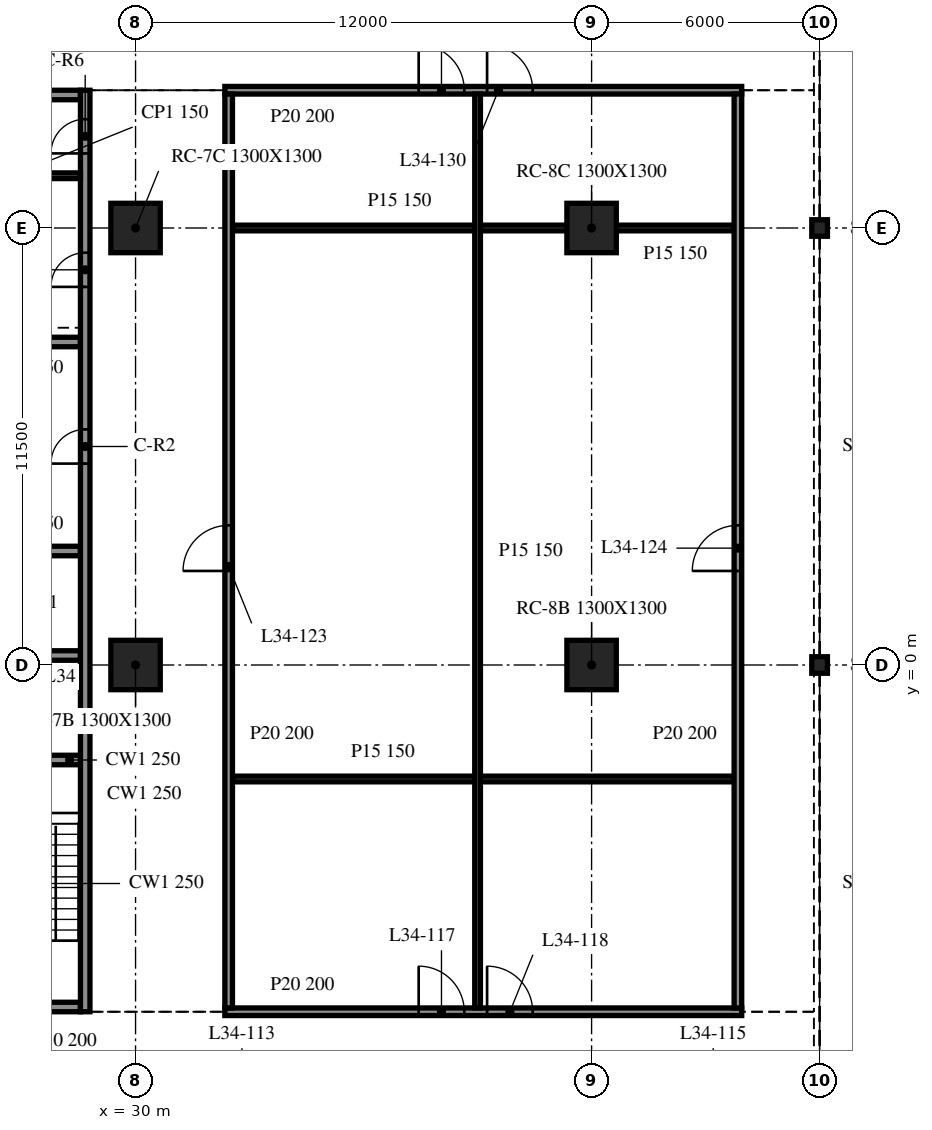
"""IFC4 building model, lengths in metres.
Left out: names, types, materials, properties, quantities, classifications, styles, units other than length and angle.
Written with IfcOpenShell. Run it as: python <this file> out.ifc"""

import sys

from ifc_helpers import new_model, si_unit, direction, frame, frame_2d, origin, origin_2d, place, context, subcontext, project, spatial, rectangle, i_section, extrude, element, fill, save


model = new_model("IFC4")
c1 = context("Model", 3, precision=1e-05, world=origin(), true_north=direction((0.0, 1.0)))
c2 = subcontext(c1, "Body", "Model", "MODEL_VIEW")
j1 = project(units=[si_unit("LENGTHUNIT", "METRE"), si_unit("PLANEANGLEUNIT", "RADIAN")], contexts=[c1])
p1 = place(None, origin())
s1 = spatial("IfcSite", under=j1, at=p1, CompositionType="ELEMENT")
p2 = place(p1, origin())
s2 = spatial("IfcBuilding", under=s1, at=p2, CompositionType="ELEMENT")
p3 = place(p2, frame((0.0, 0.0, 146.6)))
s3 = spatial("IfcBuildingStorey", under=s2, at=p3, CompositionType="ELEMENT", Elevation=146.6)
for number, where, z_axis, x_axis in (
    (1, (30.0, 0.0, -0.34), (0.0, 0.0, 1.0), (1.0, 0.0, 0.0)),
    (2, (30.0, 11.5, -0.34), (0.0, 0.0, 1.0), (1.0, 0.0, 0.0)),
    (3, (42.0, 0.0, -0.34), (0.0, 0.0, 1.0), (1.0, 0.0, 0.0)),
    (4, (42.0, 11.5, -0.34), (0.0, 0.0, 1.0), (1.0, 0.0, 0.0)),
):
    element("IfcColumn", number, at=place(p3, frame(where, z_axis=z_axis, x_axis=x_axis)), inside=s3, PredefinedType="COLUMN", context=c2, shape_type="SweptSolid", body=[
        extrude(rectangle(XDim=1.3, YDim=1.3, at=origin_2d()), origin(), (0.0, 0.0, 1.0), 4.1),
    ])
for number, where, z_axis, x_axis in (
    (5, (48.0, 0.0, -0.34), (0.0, 0.0, 1.0), (1.0, 0.0, 0.0)),
    (6, (48.0, 11.5, -0.34), (0.0, 0.0, 1.0), (1.0, 0.0, 0.0)),
):
    element("IfcColumn", number, at=place(p3, frame(where, z_axis=z_axis, x_axis=x_axis)), inside=s3, PredefinedType="COLUMN", context=c2, shape_type="SweptSolid", body=[
        extrude(i_section(OverallWidth=0.412, OverallDepth=0.434, WebThickness=0.036, FlangeThickness=0.057, at=origin_2d()), origin(), (0.0, 0.0, 1.0), 4.1),
    ])
p4 = place(p3, frame((28.675, -9.125, 0.0), z_axis=(0.0, 0.0, 1.0), x_axis=(0.0, 1.0, 0.0)))
e7 = element("IfcWall", 7, at=p4, inside=s3, PredefinedType="SOLIDWALL", context=c2, shape_type="SweptSolid", body=[
    extrude(rectangle(XDim=24.25, YDim=0.25, at=frame_2d((12.125, 0.0))), origin(), (0.0, 0.0, 1.0), 3.76),
])
p5 = place(p4, frame((14.425, 0.0, 0.0)))
e8 = element("IfcOpeningElement", 8, at=p5, cuts=e7, PredefinedType="OPENING", context=c2, shape_type="SweptSolid", body=[
    extrude(rectangle(XDim=0.9, YDim=2.1, at=frame_2d((0.45, 1.05))), frame((0.0, 0.135, 0.0), z_axis=(0.0, -1.0, 0.0), x_axis=(1.0, 0.0, 0.0)), (0.0, 0.0, 1.0), 0.27),
])
p6 = place(p4, frame((19.075, 0.0, 0.0)))
e9 = element("IfcOpeningElement", 9, at=p6, cuts=e7, PredefinedType="OPENING", context=c2, shape_type="SweptSolid", body=[
    extrude(rectangle(XDim=0.9, YDim=2.1, at=frame_2d((0.45, 1.05))), frame((0.0, 0.135, 0.0), z_axis=(0.0, -1.0, 0.0), x_axis=(1.0, 0.0, 0.0)), (0.0, 0.0, 1.0), 0.27),
])
p7 = place(p4, frame((22.587, 0.0, 0.0)))
e10 = element("IfcOpeningElement", 10, at=p7, cuts=e7, PredefinedType="OPENING", context=c2, shape_type="SweptSolid", body=[
    extrude(rectangle(XDim=0.9, YDim=2.1, at=frame_2d((0.45, 1.05))), frame((0.0, 0.135, 0.0), z_axis=(0.0, -1.0, 0.0), x_axis=(1.0, 0.0, 0.0)), (0.0, 0.0, 1.0), 0.27),
])
p8 = place(p3, frame((28.55, -9.0, 0.0), z_axis=(0.0, 0.0, 1.0), x_axis=(-1.0, 0.0, 0.0)))
e11 = element("IfcWall", 11, at=p8, inside=s3, PredefinedType="SOLIDWALL", context=c2, shape_type="SweptSolid", body=[
    extrude(rectangle(XDim=9.1, YDim=0.25, at=frame_2d((4.55, 0.0))), origin(), (0.0, 0.0, 1.0), 3.76),
])
p9 = place(p8, frame((3.65, 0.0, 0.0)))
e12 = element("IfcOpeningElement", 12, at=p9, cuts=e11, PredefinedType="OPENING", context=c2, shape_type="SweptSolid", body=[
    extrude(rectangle(XDim=1.8, YDim=2.1, at=frame_2d((0.9, 1.05))), frame((0.0, 0.135, 0.0), z_axis=(0.0, -1.0, 0.0), x_axis=(1.0, 0.0, 0.0)), (0.0, 0.0, 1.0), 0.27),
])
p10 = place(p3, frame((19.45, 15.0, 0.0), z_axis=(0.0, 0.0, 1.0), x_axis=(1.0, 0.0, 0.0)))
e13 = element("IfcWall", 13, at=p10, inside=s3, PredefinedType="SOLIDWALL", context=c2, shape_type="SweptSolid", body=[
    extrude(rectangle(XDim=9.1, YDim=0.25, at=frame_2d((4.55, 0.0))), origin(), (0.0, 0.0, 1.0), 3.76),
])
p11 = place(p10, frame((3.65, 0.0, 0.0)))
e14 = element("IfcOpeningElement", 14, at=p11, cuts=e13, PredefinedType="OPENING", context=c2, shape_type="SweptSolid", body=[
    extrude(rectangle(XDim=1.8, YDim=2.1, at=frame_2d((0.9, 1.05))), frame((0.0, 0.135, 0.0), z_axis=(0.0, -1.0, 0.0), x_axis=(1.0, 0.0, 0.0)), (0.0, 0.0, 1.0), 0.27),
])
for number, where, z_axis, x_axis in (
    (15, (25.7, -2.5, 0.0), (0.0, 0.0, 1.0), (1.0, 0.0, 0.0)),
    (16, (25.7, 0.25, 0.0), (0.0, 0.0, 1.0), (1.0, 0.0, 0.0)),
    (17, (25.7, 3.0, 0.0), (0.0, 0.0, 1.0), (1.0, 0.0, 0.0)),
    (18, (25.7, 8.5, 0.0), (0.0, 0.0, 1.0), (1.0, 0.0, 0.0)),
):
    element("IfcWall", number, at=place(p3, frame(where, z_axis=z_axis, x_axis=x_axis)), inside=s3, PredefinedType="SOLIDWALL", context=c2, shape_type="SweptSolid", body=[
        extrude(rectangle(XDim=2.85, YDim=0.25, at=frame_2d((1.425, 0.0))), origin(), (0.0, 0.0, 1.0), 3.76),
    ])
p12 = place(p3, frame((25.7, 12.875, 0.0), z_axis=(0.0, 0.0, 1.0), x_axis=(1.0, 0.0, 0.0)))
e19 = element("IfcWall", 19, at=p12, inside=s3, PredefinedType="PARTITIONING", context=c2, shape_type="SweptSolid", body=[
    extrude(rectangle(XDim=2.85, YDim=0.15, at=frame_2d((1.425, 0.0))), origin(), (0.0, 0.0, 1.0), 3.76),
])
p13 = place(p3, frame((32.35, -9.125, 0.0), z_axis=(0.0, 0.0, 1.0), x_axis=(1.0, 0.0, 0.0)))
e20 = element("IfcWall", 20, at=p13, inside=s3, PredefinedType="PARTITIONING", context=c2, shape_type="SweptSolid", body=[
    extrude(rectangle(XDim=13.6, YDim=0.2, at=frame_2d((6.8, 0.0))), origin(), (0.0, 0.0, 1.0), 3.76),
])
p14 = place(p13, frame((5.1, 0.0, 0.0)))
e21 = element("IfcOpeningElement", 21, at=p14, cuts=e20, PredefinedType="OPENING", context=c2, shape_type="SweptSolid", body=[
    extrude(rectangle(XDim=1.2, YDim=2.1, at=frame_2d((0.6, 1.05))), frame((0.0, 0.11, 0.0), z_axis=(0.0, -1.0, 0.0), x_axis=(1.0, 0.0, 0.0)), (0.0, 0.0, 1.0), 0.22),
])
p15 = place(p13, frame((6.9, 0.0, 0.0)))
e22 = element("IfcOpeningElement", 22, at=p15, cuts=e20, PredefinedType="OPENING", context=c2, shape_type="SweptSolid", body=[
    extrude(rectangle(XDim=1.2, YDim=2.1, at=frame_2d((0.6, 1.05))), frame((0.0, 0.11, 0.0), z_axis=(0.0, -1.0, 0.0), x_axis=(1.0, 0.0, 0.0)), (0.0, 0.0, 1.0), 0.22),
])
p16 = place(p3, frame((32.55, -3.0, 0.0), z_axis=(0.0, 0.0, 1.0), x_axis=(1.0, 0.0, 0.0)))
e23 = element("IfcWall", 23, at=p16, inside=s3, PredefinedType="PARTITIONING", context=c2, shape_type="SweptSolid", body=[
    extrude(rectangle(XDim=13.2, YDim=0.15, at=frame_2d((6.6, 0.0))), origin(), (0.0, 0.0, 1.0), 3.76),
])
p17 = place(p3, frame((32.55, 11.5, 0.0), z_axis=(0.0, 0.0, 1.0), x_axis=(1.0, 0.0, 0.0)))
e24 = element("IfcWall", 24, at=p17, inside=s3, PredefinedType="PARTITIONING", context=c2, shape_type="SweptSolid", body=[
    extrude(rectangle(XDim=8.8, YDim=0.15, at=frame_2d((4.4, 0.0))), origin(), (0.0, 0.0, 1.0), 3.76),
])
p18 = place(p3, frame((42.65, 11.5, 0.0), z_axis=(0.0, 0.0, 1.0), x_axis=(1.0, 0.0, 0.0)))
e25 = element("IfcWall", 25, at=p18, inside=s3, PredefinedType="PARTITIONING", context=c2, shape_type="SweptSolid", body=[
    extrude(rectangle(XDim=3.1, YDim=0.15, at=frame_2d((1.55, 0.0))), origin(), (0.0, 0.0, 1.0), 3.76),
])
p19 = place(p3, frame((32.35, 15.125, 0.0), z_axis=(0.0, 0.0, 1.0), x_axis=(1.0, 0.0, 0.0)))
e26 = element("IfcWall", 26, at=p19, inside=s3, PredefinedType="PARTITIONING", context=c2, shape_type="SweptSolid", body=[
    extrude(rectangle(XDim=13.6, YDim=0.2, at=frame_2d((6.8, 0.0))), origin(), (0.0, 0.0, 1.0), 3.76),
])
p20 = place(p19, frame((5.1, 0.0, 0.0)))
e27 = element("IfcOpeningElement", 27, at=p20, cuts=e26, PredefinedType="OPENING", context=c2, shape_type="SweptSolid", body=[
    extrude(rectangle(XDim=1.2, YDim=2.1, at=frame_2d((0.6, 1.05))), frame((0.0, 0.11, 0.0), z_axis=(0.0, -1.0, 0.0), x_axis=(1.0, 0.0, 0.0)), (0.0, 0.0, 1.0), 0.22),
])
p21 = place(p19, frame((6.9, 0.0, 0.0)))
e28 = element("IfcOpeningElement", 28, at=p21, cuts=e26, PredefinedType="OPENING", context=c2, shape_type="SweptSolid", body=[
    extrude(rectangle(XDim=1.2, YDim=2.1, at=frame_2d((0.6, 1.05))), frame((0.0, 0.11, 0.0), z_axis=(0.0, -1.0, 0.0), x_axis=(1.0, 0.0, 0.0)), (0.0, 0.0, 1.0), 0.22),
])
p22 = place(p3, frame((32.45, -9.025, 0.0), z_axis=(0.0, 0.0, 1.0), x_axis=(0.0, 1.0, 0.0)))
e29 = element("IfcWall", 29, at=p22, inside=s3, PredefinedType="PARTITIONING", context=c2, shape_type="SweptSolid", body=[
    extrude(rectangle(XDim=24.05, YDim=0.2, at=frame_2d((12.025, 0.0))), origin(), (0.0, 0.0, 1.0), 3.76),
])
p23 = place(p22, frame((11.5, 0.0, 0.0)))
e30 = element("IfcOpeningElement", 30, at=p23, cuts=e29, PredefinedType="OPENING", context=c2, shape_type="SweptSolid", body=[
    extrude(rectangle(XDim=1.2, YDim=2.1, at=frame_2d((0.6, 1.05))), frame((0.0, 0.11, 0.0), z_axis=(0.0, -1.0, 0.0), x_axis=(1.0, 0.0, 0.0)), (0.0, 0.0, 1.0), 0.22),
])
p24 = place(p3, frame((39.0, -9.025, 0.0), z_axis=(0.0, 0.0, 1.0), x_axis=(0.0, 1.0, 0.0)))
e31 = element("IfcWall", 31, at=p24, inside=s3, PredefinedType="PARTITIONING", context=c2, shape_type="SweptSolid", body=[
    extrude(rectangle(XDim=24.05, YDim=0.15, at=frame_2d((12.025, 0.0))), origin(), (0.0, 0.0, 1.0), 3.76),
])
p25 = place(p3, frame((45.85, -9.025, 0.0), z_axis=(0.0, 0.0, 1.0), x_axis=(0.0, 1.0, 0.0)))
e32 = element("IfcWall", 32, at=p25, inside=s3, PredefinedType="PARTITIONING", context=c2, shape_type="SweptSolid", body=[
    extrude(rectangle(XDim=24.05, YDim=0.2, at=frame_2d((12.025, 0.0))), origin(), (0.0, 0.0, 1.0), 3.76),
])
p26 = place(p25, frame((11.5, 0.0, 0.0)))
e33 = element("IfcOpeningElement", 33, at=p26, cuts=e32, PredefinedType="OPENING", context=c2, shape_type="SweptSolid", body=[
    extrude(rectangle(XDim=1.2, YDim=2.1, at=frame_2d((0.6, 1.05))), frame((0.0, 0.11, 0.0), z_axis=(0.0, -1.0, 0.0), x_axis=(1.0, 0.0, 0.0)), (0.0, 0.0, 1.0), 0.22),
])
p27 = place(p5, origin())
e34 = element("IfcDoor", 34, at=p27, inside=s3, OperationType="SINGLE_SWING_RIGHT", PredefinedType="DOOR", context=c2, shape_type="SweptSolid", body=[
    extrude(rectangle(XDim=0.9, YDim=2.1, at=frame_2d((0.45, 1.05))), frame((0.0, 0.025, 0.0), z_axis=(0.0, -1.0, 0.0), x_axis=(1.0, 0.0, 0.0)), (0.0, 0.0, 1.0), 0.05),
])
fill(e8, e34)
p28 = place(p6, origin())
e35 = element("IfcDoor", 35, at=p28, inside=s3, OperationType="SINGLE_SWING_LEFT", PredefinedType="DOOR", context=c2, shape_type="SweptSolid", body=[
    extrude(rectangle(XDim=0.9, YDim=2.1, at=frame_2d((0.45, 1.05))), frame((0.0, 0.025, 0.0), z_axis=(0.0, -1.0, 0.0), x_axis=(1.0, 0.0, 0.0)), (0.0, 0.0, 1.0), 0.05),
])
fill(e9, e35)
p29 = place(p7, origin())
e36 = element("IfcDoor", 36, at=p29, inside=s3, OperationType="SINGLE_SWING_RIGHT", PredefinedType="DOOR", context=c2, shape_type="SweptSolid", body=[
    extrude(rectangle(XDim=0.9, YDim=2.1, at=frame_2d((0.45, 1.05))), frame((0.0, 0.025, 0.0), z_axis=(0.0, -1.0, 0.0), x_axis=(1.0, 0.0, 0.0)), (0.0, 0.0, 1.0), 0.05),
])
fill(e10, e36)
p30 = place(p14, origin())
e37 = element("IfcDoor", 37, at=p30, inside=s3, OperationType="SINGLE_SWING_LEFT", PredefinedType="DOOR", context=c2, shape_type="SweptSolid", body=[
    extrude(rectangle(XDim=1.2, YDim=2.1, at=frame_2d((0.6, 1.05))), frame((0.0, 0.025, 0.0), z_axis=(0.0, -1.0, 0.0), x_axis=(1.0, 0.0, 0.0)), (0.0, 0.0, 1.0), 0.05),
])
fill(e21, e37)
p31 = place(p15, origin())
e38 = element("IfcDoor", 38, at=p31, inside=s3, OperationType="SINGLE_SWING_RIGHT", PredefinedType="DOOR", context=c2, shape_type="SweptSolid", body=[
    extrude(rectangle(XDim=1.2, YDim=2.1, at=frame_2d((0.6, 1.05))), frame((0.0, 0.025, 0.0), z_axis=(0.0, -1.0, 0.0), x_axis=(1.0, 0.0, 0.0)), (0.0, 0.0, 1.0), 0.05),
])
fill(e22, e38)
p32 = place(p23, origin())
e39 = element("IfcDoor", 39, at=p32, inside=s3, OperationType="SINGLE_SWING_LEFT", PredefinedType="DOOR", context=c2, shape_type="SweptSolid", body=[
    extrude(rectangle(XDim=1.2, YDim=2.1, at=frame_2d((0.6, 1.05))), frame((0.0, 0.025, 0.0), z_axis=(0.0, -1.0, 0.0), x_axis=(1.0, 0.0, 0.0)), (0.0, 0.0, 1.0), 0.05),
])
fill(e30, e39)
p33 = place(p26, origin())
e40 = element("IfcDoor", 40, at=p33, inside=s3, OperationType="SINGLE_SWING_RIGHT", PredefinedType="DOOR", context=c2, shape_type="SweptSolid", body=[
    extrude(rectangle(XDim=1.2, YDim=2.1, at=frame_2d((0.6, 1.05))), frame((0.0, 0.025, 0.0), z_axis=(0.0, -1.0, 0.0), x_axis=(1.0, 0.0, 0.0)), (0.0, 0.0, 1.0), 0.05),
])
fill(e33, e40)
p34 = place(p20, origin())
e41 = element("IfcDoor", 41, at=p34, inside=s3, OperationType="SINGLE_SWING_RIGHT", PredefinedType="DOOR", context=c2, shape_type="SweptSolid", body=[
    extrude(rectangle(XDim=1.2, YDim=2.1, at=frame_2d((0.6, 1.05))), frame((0.0, 0.025, 0.0), z_axis=(0.0, -1.0, 0.0), x_axis=(1.0, 0.0, 0.0)), (0.0, 0.0, 1.0), 0.05),
])
fill(e27, e41)
p35 = place(p21, origin())
e42 = element("IfcDoor", 42, at=p35, inside=s3, OperationType="SINGLE_SWING_LEFT", PredefinedType="DOOR", context=c2, shape_type="SweptSolid", body=[
    extrude(rectangle(XDim=1.2, YDim=2.1, at=frame_2d((0.6, 1.05))), frame((0.0, 0.025, 0.0), z_axis=(0.0, -1.0, 0.0), x_axis=(1.0, 0.0, 0.0)), (0.0, 0.0, 1.0), 0.05),
])
fill(e28, e42)
save(model, sys.argv[1])
